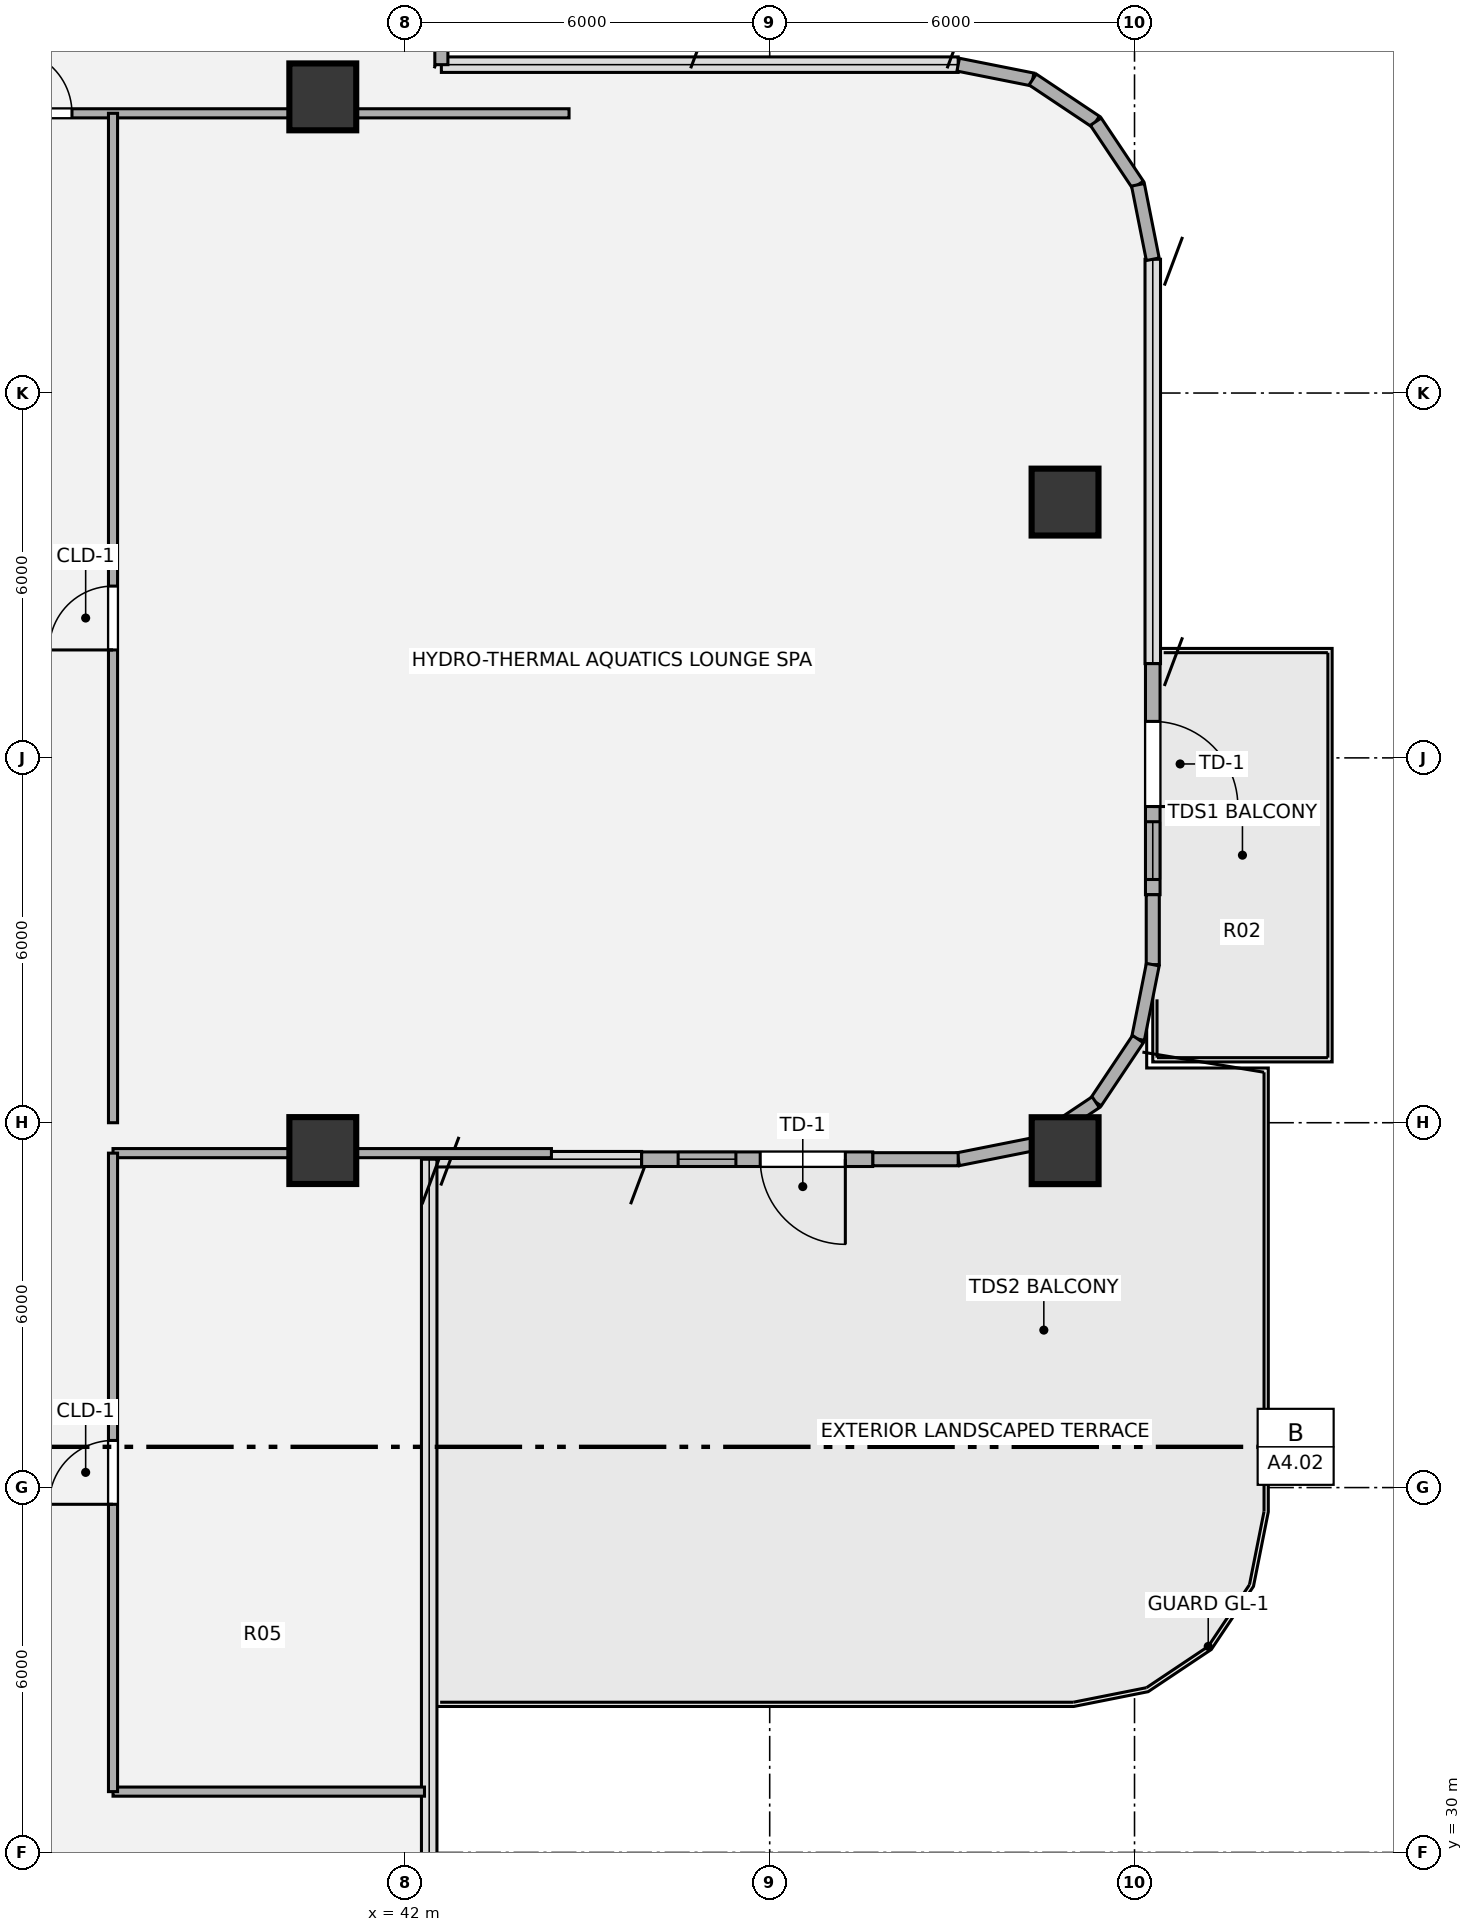
"""IFC4 building model, lengths in metres.
Left out: names, types, materials, properties, quantities, classifications, styles, units other than length and angle.
Written with IfcOpenShell. Run it as: python <this file> out.ifc"""

import sys

from ifc_helpers import new_model, si_unit, direction, frame, frame_2d, origin, origin_2d, place, context, subcontext, project, spatial, rectangle, hollow_circle, extrude, source, transform, mapped, element, fill, save


model = new_model("IFC4")
c1 = context("Model", 3, precision=1e-05, world=origin(), true_north=direction((0.0, 1.0)))
c2 = subcontext(c1, "Body", "Model", "MODEL_VIEW")
j1 = project(units=[si_unit("LENGTHUNIT", "METRE"), si_unit("PLANEANGLEUNIT", "RADIAN")], contexts=[c1])
p1 = place(None, origin())
s1 = spatial("IfcSite", under=j1, at=p1, CompositionType="ELEMENT")
p2 = place(p1, origin())
s2 = spatial("IfcBuilding", under=s1, at=p2, CompositionType="ELEMENT")
p3 = place(p2, frame((0.0, 0.0, 218.52)))
s3 = spatial("IfcBuildingStorey", under=s2, at=p3, CompositionType="ELEMENT", Elevation=218.52)
m1 = source(origin(), c2, "Body", "SweptSolid", [
    extrude(hollow_circle(Radius=0.55, WallThickness=0.04, at=origin_2d()), origin(), (0.0, 0.0, 1.0), 5.049),
])
p4 = place(p3, frame((53.214, 39.859, 0.0), z_axis=(-0.140579075129, 0.665997599821, 0.73258768804), x_axis=(-0.978440346297, -0.206529631621, 0.0)))
e1 = element("IfcColumn", 1, at=p4, inside=s3, PredefinedType="COLUMN", context=c2, shape_type="MappedRepresentation", body=[
    mapped(m1, transform((0.0, 0.0, 0.0), x_axis=(1.0, 0.0, 0.0), y_axis=(0.0, 1.0, 0.0), z_axis=(0.0, 0.0, 1.0), scale=1.0)),
])
m2 = source(origin(), c2, "Body", "SweptSolid", [
    extrude(hollow_circle(Radius=0.55, WallThickness=0.04, at=origin_2d()), origin(), (0.0, 0.0, 1.0), 4.92),
])
p5 = place(p3, frame((53.214, 50.632, 0.0), z_axis=(-0.144797912538, 0.640177474177, 0.754457663545), x_axis=(-0.975361817364, -0.220611253629, 0.0)))
e2 = element("IfcColumn", 2, at=p5, inside=s3, PredefinedType="COLUMN", context=c2, shape_type="MappedRepresentation", body=[
    mapped(m2, transform((0.0, 0.0, 0.0), x_axis=(1.0, 0.0, 0.0), y_axis=(0.0, 1.0, 0.0), z_axis=(0.0, 0.0, 1.0), scale=1.0)),
])
m3 = source(origin(), c2, "Body", "SweptSolid", [
    extrude(hollow_circle(Radius=0.55, WallThickness=0.04, at=origin_2d()), origin(), (0.0, 0.0, 1.0), 5.004),
])
p6 = place(p3, frame((40.65, 39.859, 0.0), z_axis=(0.0, 0.672694647561, 0.739920205929), x_axis=(-1.0, 0.0, 0.0)))
e3 = element("IfcColumn", 3, at=p6, inside=s3, PredefinedType="COLUMN", context=c2, shape_type="MappedRepresentation", body=[
    mapped(m3, transform((0.0, 0.0, 0.0), x_axis=(1.0, 0.0, 0.0), y_axis=(0.0, 1.0, 0.0), z_axis=(0.0, 0.0, 1.0), scale=1.0)),
])
m4 = source(origin(), c2, "Body", "SweptSolid", [
    extrude(hollow_circle(Radius=0.55, WallThickness=0.04, at=origin_2d()), origin(), (0.0, 0.0, 1.0), 4.429),
])
p7 = place(p3, frame((40.65, 57.723, 0.0), z_axis=(0.0, 0.518300494478, 0.855198571926), x_axis=(-1.0, 0.0, 0.0)))
e4 = element("IfcColumn", 4, at=p7, inside=s3, PredefinedType="COLUMN", context=c2, shape_type="MappedRepresentation", body=[
    mapped(m4, transform((0.0, 0.0, 0.0), x_axis=(1.0, 0.0, 0.0), y_axis=(0.0, 1.0, 0.0), z_axis=(0.0, 0.0, 1.0), scale=1.0)),
])
p8 = place(p3, frame((42.6, 59.8, 0.0), z_axis=(0.0, 0.0, 1.0), x_axis=(0.0, -1.0, 0.0)))
e5 = element("IfcWall", 5, at=p8, inside=s3, PredefinedType="SOLIDWALL", context=c2, shape_type="SweptSolid", body=[
    extrude(rectangle(XDim=0.4, YDim=0.215, at=frame_2d((0.2, 0.0))), origin(), (0.0, 0.0, 1.0), 4.092),
])
for number, where, z_axis, x_axis in (
    (6, (51.1, 59.4, 0.0), (0.0, 0.0, 1.0), (0.981, -0.195, 0.0)),
    (7, (52.325, 59.156, 0.0), (0.0, 0.0, 1.0), (0.831, -0.556, 0.0)),
    (8, (53.363, 58.463, 0.0), (0.0, 0.0, 1.0), (0.556, -0.831, 0.0)),
    (9, (54.056, 57.425, 0.0), (0.0, 0.0, 1.0), (0.195, -0.981, 0.0)),
):
    element("IfcWall", number, at=place(p3, frame(where, z_axis=z_axis, x_axis=x_axis)), inside=s3, PredefinedType="SOLIDWALL", context=c2, shape_type="SweptSolid", body=[
        extrude(rectangle(XDim=1.249, YDim=0.215, at=frame_2d((0.624, 0.0))), origin(), (0.0, 0.0, 1.0), 4.092),
    ])
p9 = place(p3, frame((54.3, 49.55, 0.0), z_axis=(0.0, 0.0, 1.0), x_axis=(0.0, -1.0, 0.0)))
e10 = element("IfcWall", 10, at=p9, inside=s3, PredefinedType="SOLIDWALL", context=c2, shape_type="SweptSolid", body=[
    extrude(rectangle(XDim=3.8, YDim=0.24, at=frame_2d((1.9, 0.0))), origin(), (0.0, 0.0, 1.0), 4.092),
])
p10 = place(p9, frame((0.95, 0.0, 0.0)))
e11 = element("IfcOpeningElement", 11, at=p10, cuts=e10, PredefinedType="OPENING", context=c2, shape_type="SweptSolid", body=[
    extrude(rectangle(XDim=1.4, YDim=2.15, at=origin_2d()), frame((0.7, 0.13, 1.075), z_axis=(0.0, -1.0, 0.0), x_axis=(1.0, 0.0, 0.0)), (0.0, 0.0, 1.0), 0.26),
])
p11 = place(p9, frame((2.6, 0.0, 0.85)))
e12 = element("IfcOpeningElement", 12, at=p11, cuts=e10, PredefinedType="OPENING", context=c2, shape_type="SweptSolid", body=[
    extrude(rectangle(XDim=0.95, YDim=1.35, at=origin_2d()), frame((0.475, 0.13, 0.675), z_axis=(0.0, -1.0, 0.0), x_axis=(1.0, 0.0, 0.0)), (0.0, 0.0, 1.0), 0.26),
])
p12 = place(p3, frame((54.3, 45.75, 0.0), z_axis=(0.0, 0.0, 1.0), x_axis=(0.0, -1.0, 0.0)))
e13 = element("IfcWall", 13, at=p12, inside=s3, PredefinedType="SOLIDWALL", context=c2, shape_type="SweptSolid", body=[
    extrude(rectangle(XDim=1.15, YDim=0.215, at=frame_2d((0.575, 0.0))), origin(), (0.0, 0.0, 1.0), 4.092),
])
for number, where, z_axis, x_axis in (
    (14, (54.3, 44.6, 0.0), (0.0, 0.0, 1.0), (-0.195, -0.981, 0.0)),
    (15, (54.056, 43.375, 0.0), (0.0, 0.0, 1.0), (-0.556, -0.831, 0.0)),
    (16, (53.363, 42.337, 0.0), (0.0, 0.0, 1.0), (-0.831, -0.556, 0.0)),
    (17, (52.325, 41.644, 0.0), (0.0, 0.0, 1.0), (-0.981, -0.195, 0.0)),
):
    element("IfcWall", number, at=place(p3, frame(where, z_axis=z_axis, x_axis=x_axis)), inside=s3, PredefinedType="SOLIDWALL", context=c2, shape_type="SweptSolid", body=[
        extrude(rectangle(XDim=1.249, YDim=0.215, at=frame_2d((0.624, 0.0))), origin(), (0.0, 0.0, 1.0), 4.092),
    ])
p13 = place(p3, frame((51.1, 41.4, 0.0), z_axis=(0.0, 0.0, 1.0), x_axis=(-1.0, 0.0, 0.0)))
e18 = element("IfcWall", 18, at=p13, inside=s3, PredefinedType="SOLIDWALL", context=c2, shape_type="SweptSolid", body=[
    extrude(rectangle(XDim=1.406, YDim=0.215, at=frame_2d((0.703, 0.0))), origin(), (0.0, 0.0, 1.0), 4.092),
])
p14 = place(p3, frame((49.694, 41.4, 0.0), z_axis=(0.0, 0.0, 1.0), x_axis=(-1.0, 0.0, 0.0)))
e19 = element("IfcWall", 19, at=p14, inside=s3, PredefinedType="SOLIDWALL", context=c2, shape_type="SweptSolid", body=[
    extrude(rectangle(XDim=3.8, YDim=0.24, at=frame_2d((1.9, 0.0))), origin(), (0.0, 0.0, 1.0), 4.092),
])
p15 = place(p14, frame((0.45, 0.0, 0.0)))
e20 = element("IfcOpeningElement", 20, at=p15, cuts=e19, PredefinedType="OPENING", context=c2, shape_type="SweptSolid", body=[
    extrude(rectangle(XDim=1.4, YDim=2.15, at=origin_2d()), frame((0.7, 0.13, 1.075), z_axis=(0.0, -1.0, 0.0), x_axis=(1.0, 0.0, 0.0)), (0.0, 0.0, 1.0), 0.26),
])
p16 = place(p14, frame((2.25, 0.0, 0.85)))
e21 = element("IfcOpeningElement", 21, at=p16, cuts=e19, PredefinedType="OPENING", context=c2, shape_type="SweptSolid", body=[
    extrude(rectangle(XDim=0.95, YDim=1.35, at=origin_2d()), frame((0.475, 0.13, 0.675), z_axis=(0.0, -1.0, 0.0), x_axis=(1.0, 0.0, 0.0)), (0.0, 0.0, 1.0), 0.26),
])
p17 = place(p3, frame((37.2, 31.0, 0.0), z_axis=(0.0, 0.0, 1.0), x_axis=(1.0, 0.0, 0.0)))
e22 = element("IfcWall", 22, at=p17, inside=s3, PredefinedType="PARTITIONING", context=c2, shape_type="SweptSolid", body=[
    extrude(rectangle(XDim=5.123, YDim=0.15, at=frame_2d((2.561, 0.0))), origin(), (0.0, 0.0, 1.0), 4.062),
])
p18 = place(p3, frame((37.2, 41.5, 0.0), z_axis=(0.0, 0.0, 1.0), x_axis=(1.0, 0.0, 0.0)))
e23 = element("IfcWall", 23, at=p18, inside=s3, PredefinedType="PARTITIONING", context=c2, shape_type="SweptSolid", body=[
    extrude(rectangle(XDim=7.21, YDim=0.15, at=frame_2d((3.605, 0.0))), origin(), (0.0, 0.0, 1.0), 4.062),
])
p19 = place(p3, frame((27.3, 58.6, 0.0), z_axis=(0.0, 0.0, 1.0), x_axis=(1.0, 0.0, 0.0)))
e24 = element("IfcWall", 24, at=p19, inside=s3, PredefinedType="PARTITIONING", context=c2, shape_type="SweptSolid", body=[
    extrude(rectangle(XDim=17.4, YDim=0.15, at=frame_2d((8.7, 0.0))), origin(), (0.0, 0.0, 1.0), 3.87),
])
p20 = place(p19, frame((8.175, 0.0, 0.0)))
e25 = element("IfcOpeningElement", 25, at=p20, cuts=e24, PredefinedType="OPENING", context=c2, shape_type="SweptSolid", body=[
    extrude(rectangle(XDim=1.05, YDim=2.1, at=origin_2d()), frame((0.525, 0.085, 1.05), z_axis=(0.0, -1.0, 0.0), x_axis=(1.0, 0.0, 0.0)), (0.0, 0.0, 1.0), 0.17),
])
p21 = place(p3, frame((37.2, 31.0, 0.0), z_axis=(0.0, 0.0, 1.0), x_axis=(0.0, 1.0, 0.0)))
e26 = element("IfcWall", 26, at=p21, inside=s3, PredefinedType="PARTITIONING", context=c2, shape_type="SweptSolid", body=[
    extrude(rectangle(XDim=10.5, YDim=0.15, at=frame_2d((5.25, 0.0))), origin(), (0.0, 0.0, 1.0), 4.062),
])
p22 = place(p21, frame((4.725, 0.0, 0.0)))
e27 = element("IfcOpeningElement", 27, at=p22, cuts=e26, PredefinedType="OPENING", context=c2, shape_type="SweptSolid", body=[
    extrude(rectangle(XDim=1.05, YDim=2.1, at=origin_2d()), frame((0.525, 0.085, 1.05), z_axis=(0.0, -1.0, 0.0), x_axis=(1.0, 0.0, 0.0)), (0.0, 0.0, 1.0), 0.17),
])
p23 = place(p3, frame((37.2, 42.0, 0.0), z_axis=(0.0, 0.0, 1.0), x_axis=(0.0, 1.0, 0.0)))
e28 = element("IfcWall", 28, at=p23, inside=s3, PredefinedType="PARTITIONING", context=c2, shape_type="SweptSolid", body=[
    extrude(rectangle(XDim=16.6, YDim=0.15, at=frame_2d((8.3, 0.0))), origin(), (0.0, 0.0, 1.0), 4.062),
])
p24 = place(p23, frame((7.775, 0.0, 0.0)))
e29 = element("IfcOpeningElement", 29, at=p24, cuts=e28, PredefinedType="OPENING", context=c2, shape_type="SweptSolid", body=[
    extrude(rectangle(XDim=1.05, YDim=2.1, at=origin_2d()), frame((0.525, 0.085, 1.05), z_axis=(0.0, -1.0, 0.0), x_axis=(1.0, 0.0, 0.0)), (0.0, 0.0, 1.0), 0.17),
])
m5 = source(origin(), c2, "Body", "SweptSolid", [
    extrude(rectangle(XDim=1.4, YDim=2.15, at=origin_2d()), frame((0.7, 0.025, 1.075), z_axis=(0.0, -1.0, 0.0), x_axis=(1.0, 0.0, 0.0)), (0.0, 0.0, 1.0), 0.05),
])
p25 = place(p10, origin())
e30 = element("IfcDoor", 30, at=p25, inside=s3, OperationType="SINGLE_SWING_RIGHT", PredefinedType="DOOR", context=c2, shape_type="MappedRepresentation", body=[
    mapped(m5, transform((0.0, 0.0, 0.0), x_axis=(1.0, 0.0, 0.0), y_axis=(0.0, 1.0, 0.0), z_axis=(0.0, 0.0, 1.0), scale=1.0)),
])
fill(e11, e30)
m6 = source(origin(), c2, "Body", "SweptSolid", [
    extrude(rectangle(XDim=0.95, YDim=1.35, at=origin_2d()), frame((0.475, 0.03, 0.675), z_axis=(0.0, -1.0, 0.0), x_axis=(1.0, 0.0, 0.0)), (0.0, 0.0, 1.0), 0.06),
])
p26 = place(p11, origin())
e31 = element("IfcWindow", 31, at=p26, inside=s3, PartitioningType="SINGLE_PANEL", PredefinedType="WINDOW", context=c2, shape_type="MappedRepresentation", body=[
    mapped(m6, transform((0.0, 0.0, 0.0), x_axis=(1.0, 0.0, 0.0), y_axis=(0.0, 1.0, 0.0), z_axis=(0.0, 0.0, 1.0), scale=1.0)),
])
fill(e12, e31)
p27 = place(p15, origin())
e32 = element("IfcDoor", 32, at=p27, inside=s3, OperationType="SINGLE_SWING_LEFT", PredefinedType="DOOR", context=c2, shape_type="MappedRepresentation", body=[
    mapped(m5, transform((0.0, 0.0, 0.0), x_axis=(1.0, 0.0, 0.0), y_axis=(0.0, 1.0, 0.0), z_axis=(0.0, 0.0, 1.0), scale=1.0)),
])
fill(e20, e32)
p28 = place(p16, origin())
e33 = element("IfcWindow", 33, at=p28, inside=s3, PartitioningType="SINGLE_PANEL", PredefinedType="WINDOW", context=c2, shape_type="MappedRepresentation", body=[
    mapped(m6, transform((0.0, 0.0, 0.0), x_axis=(1.0, 0.0, 0.0), y_axis=(0.0, 1.0, 0.0), z_axis=(0.0, 0.0, 1.0), scale=1.0)),
])
fill(e21, e33)
m7 = source(origin(), c2, "Body", "SweptSolid", [
    extrude(rectangle(XDim=1.05, YDim=2.1, at=origin_2d()), frame((0.525, 0.025, 1.05), z_axis=(0.0, -1.0, 0.0), x_axis=(1.0, 0.0, 0.0)), (0.0, 0.0, 1.0), 0.05),
])
p29 = place(p20, origin())
e34 = element("IfcDoor", 34, at=p29, inside=s3, OperationType="SINGLE_SWING_LEFT", PredefinedType="DOOR", context=c2, shape_type="MappedRepresentation", body=[
    mapped(m7, transform((0.0, 0.0, 0.0), x_axis=(1.0, 0.0, 0.0), y_axis=(0.0, 1.0, 0.0), z_axis=(0.0, 0.0, 1.0), scale=1.0)),
])
fill(e25, e34)
p30 = place(p22, origin())
e35 = element("IfcDoor", 35, at=p30, inside=s3, OperationType="SINGLE_SWING_LEFT", PredefinedType="DOOR", context=c2, shape_type="MappedRepresentation", body=[
    mapped(m7, transform((0.0, 0.0, 0.0), x_axis=(1.0, 0.0, 0.0), y_axis=(0.0, 1.0, 0.0), z_axis=(0.0, 0.0, 1.0), scale=1.0)),
])
fill(e27, e35)
p31 = place(p24, origin())
e36 = element("IfcDoor", 36, at=p31, inside=s3, OperationType="SINGLE_SWING_LEFT", PredefinedType="DOOR", context=c2, shape_type="MappedRepresentation", body=[
    mapped(m7, transform((0.0, 0.0, 0.0), x_axis=(1.0, 0.0, 0.0), y_axis=(0.0, 1.0, 0.0), z_axis=(0.0, 0.0, 1.0), scale=1.0)),
])
fill(e29, e36)
save(model, sys.argv[1])
